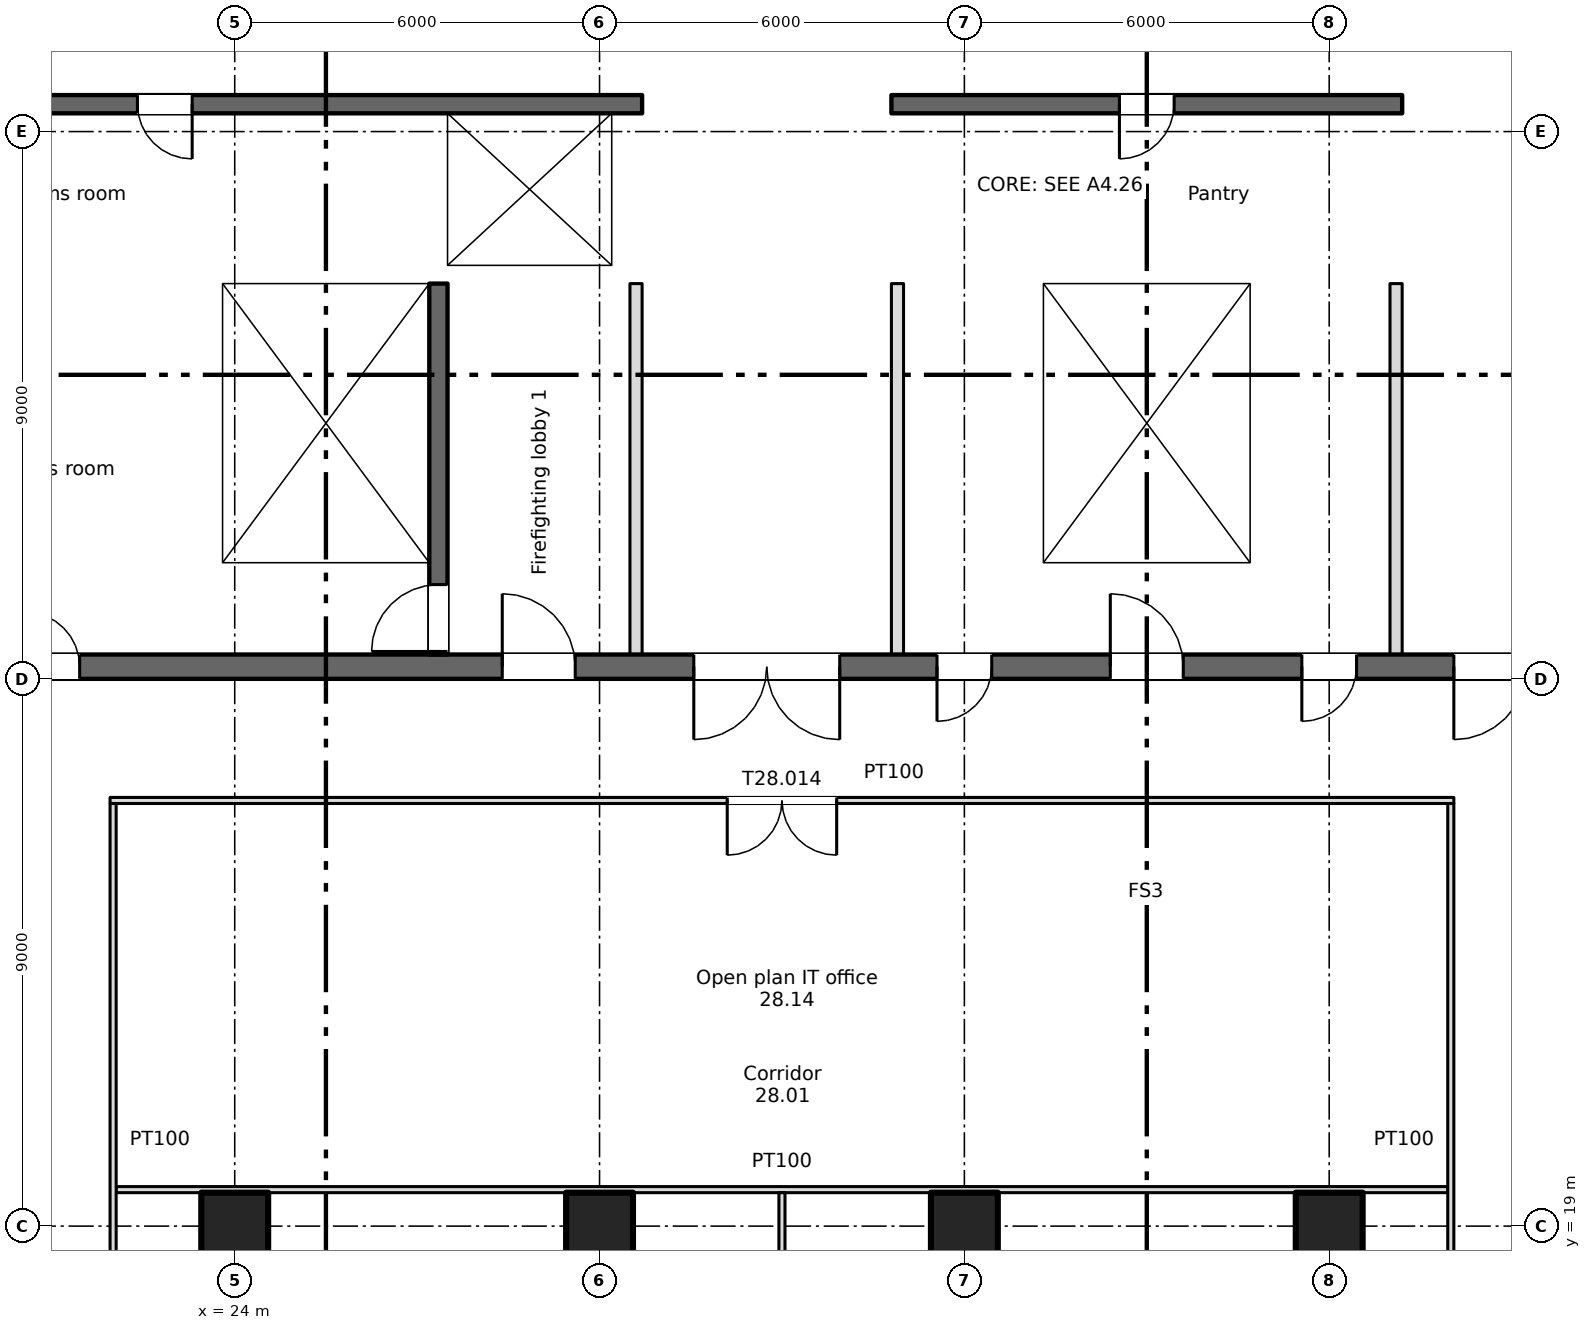
"""IFC4 building model, lengths in metres.
Left out: names, types, materials, properties, quantities, classifications, styles, units other than length and angle.
Written with IfcOpenShell. Run it as: python <this file> out.ifc"""

import sys

from ifc_helpers import new_model, si_unit, direction, frame, frame_2d, origin, origin_2d, place, context, subcontext, project, spatial, rectangle, extrude, element, fill, save


model = new_model("IFC4")
c1 = context("Model", 3, precision=1e-05, world=origin(), true_north=direction((0.0, 1.0)))
c2 = subcontext(c1, "Body", "Model", "MODEL_VIEW")
j1 = project(units=[si_unit("LENGTHUNIT", "METRE"), si_unit("PLANEANGLEUNIT", "RADIAN")], contexts=[c1])
p1 = place(None, origin())
s1 = spatial("IfcSite", under=j1, at=p1, CompositionType="ELEMENT")
p2 = place(p1, origin())
s2 = spatial("IfcBuilding", under=s1, at=p2, CompositionType="ELEMENT")
p3 = place(p2, frame((0.0, 0.0, 193.0)))
s3 = spatial("IfcBuildingStorey", under=s2, at=p3, CompositionType="ELEMENT", Elevation=193.0)
for number, where, z_axis, x_axis in (
    (1, (24.0, 19.0, 0.0), (0.0, 0.0, 1.0), (1.0, 0.0, 0.0)),
    (2, (30.0, 19.0, 0.0), (0.0, 0.0, 1.0), (1.0, 0.0, 0.0)),
    (3, (36.0, 19.0, 0.0), (0.0, 0.0, 1.0), (1.0, 0.0, 0.0)),
    (4, (42.0, 19.0, 0.0), (0.0, 0.0, 1.0), (1.0, 0.0, 0.0)),
):
    element("IfcColumn", number, at=place(p3, frame(where, z_axis=z_axis, x_axis=x_axis)), inside=s3, PredefinedType="COLUMN", context=c2, shape_type="SweptSolid", body=[
        extrude(rectangle(XDim=1.1, YDim=1.1, at=origin_2d()), origin(), (0.0, 0.0, 1.0), 3.35),
    ])
p4 = place(p3, frame((6.6, 28.2, 0.0), z_axis=(0.0, 0.0, 1.0), x_axis=(1.0, 0.0, 0.0)))
e5 = element("IfcWall", 5, at=p4, inside=s3, PredefinedType="SHEAR", context=c2, shape_type="SweptSolid", body=[
    extrude(rectangle(XDim=57.9, YDim=0.4, at=frame_2d((28.95, 0.0))), origin(), (0.0, 0.0, 1.0), 3.35),
])
p5 = place(p4, frame((13.95, 0.0, 0.0)))
e6 = element("IfcOpeningElement", 6, at=p5, cuts=e5, PredefinedType="OPENING", context=c2, shape_type="SweptSolid", body=[
    extrude(rectangle(XDim=0.9, YDim=2.1, at=frame_2d((0.45, 1.05))), frame((0.0, 0.21, 0.0), z_axis=(0.0, -1.0, 0.0), x_axis=(1.0, 0.0, 0.0)), (0.0, 0.0, 1.0), 0.42),
])
p6 = place(p4, frame((48.663, 0.0, 0.0)))
e7 = element("IfcOpeningElement", 7, at=p6, cuts=e5, PredefinedType="OPENING", context=c2, shape_type="SweptSolid", body=[
    extrude(rectangle(XDim=0.9, YDim=2.1, at=frame_2d((0.45, 1.05))), frame((0.0, 0.21, 0.0), z_axis=(0.0, -1.0, 0.0), x_axis=(1.0, 0.0, 0.0)), (0.0, 0.0, 1.0), 0.42),
])
p7 = place(p4, frame((51.238, 0.0, 0.0)))
e8 = element("IfcOpeningElement", 8, at=p7, cuts=e5, PredefinedType="OPENING", context=c2, shape_type="SweptSolid", body=[
    extrude(rectangle(XDim=0.9, YDim=2.1, at=frame_2d((0.45, 1.05))), frame((0.0, 0.21, 0.0), z_axis=(0.0, -1.0, 0.0), x_axis=(1.0, 0.0, 0.0)), (0.0, 0.0, 1.0), 0.42),
])
p8 = place(p4, frame((1.45, 0.0, 0.0)))
e9 = element("IfcOpeningElement", 9, at=p8, cuts=e5, PredefinedType="OPENING", context=c2, shape_type="SweptSolid", body=[
    extrude(rectangle(XDim=0.9, YDim=2.1, at=frame_2d((0.45, 1.05))), frame((0.0, 0.21, 0.0), z_axis=(0.0, -1.0, 0.0), x_axis=(1.0, 0.0, 0.0)), (0.0, 0.0, 1.0), 0.42),
])
p9 = place(p4, frame((4.8, 0.0, 0.0)))
e10 = element("IfcOpeningElement", 10, at=p9, cuts=e5, PredefinedType="OPENING", context=c2, shape_type="SweptSolid", body=[
    extrude(rectangle(XDim=1.2, YDim=2.1, at=frame_2d((0.6, 1.05))), frame((0.0, 0.21, 0.0), z_axis=(0.0, -1.0, 0.0), x_axis=(1.0, 0.0, 0.0)), (0.0, 0.0, 1.0), 0.42),
])
p10 = place(p4, frame((31.8, 0.0, 0.0)))
e11 = element("IfcOpeningElement", 11, at=p10, cuts=e5, PredefinedType="OPENING", context=c2, shape_type="SweptSolid", body=[
    extrude(rectangle(XDim=1.2, YDim=2.1, at=frame_2d((0.6, 1.05))), frame((0.0, 0.21, 0.0), z_axis=(0.0, -1.0, 0.0), x_axis=(1.0, 0.0, 0.0)), (0.0, 0.0, 1.0), 0.42),
])
p11 = place(p4, frame((55.3, 0.0, 0.0)))
e12 = element("IfcOpeningElement", 12, at=p11, cuts=e5, PredefinedType="OPENING", context=c2, shape_type="SweptSolid", body=[
    extrude(rectangle(XDim=1.2, YDim=2.1, at=frame_2d((0.6, 1.05))), frame((0.0, 0.21, 0.0), z_axis=(0.0, -1.0, 0.0), x_axis=(1.0, 0.0, 0.0)), (0.0, 0.0, 1.0), 0.42),
])
p12 = place(p4, frame((21.8, 0.0, 0.0)))
e13 = element("IfcOpeningElement", 13, at=p12, cuts=e5, PredefinedType="OPENING", context=c2, shape_type="SweptSolid", body=[
    extrude(rectangle(XDim=1.2, YDim=2.1, at=frame_2d((0.6, 1.05))), frame((0.0, 0.21, 0.0), z_axis=(0.0, -1.0, 0.0), x_axis=(1.0, 0.0, 0.0)), (0.0, 0.0, 1.0), 0.42),
])
p13 = place(p4, frame((41.8, 0.0, 0.0)))
e14 = element("IfcOpeningElement", 14, at=p13, cuts=e5, PredefinedType="OPENING", context=c2, shape_type="SweptSolid", body=[
    extrude(rectangle(XDim=1.2, YDim=2.1, at=frame_2d((0.6, 1.05))), frame((0.0, 0.21, 0.0), z_axis=(0.0, -1.0, 0.0), x_axis=(1.0, 0.0, 0.0)), (0.0, 0.0, 1.0), 0.42),
])
p14 = place(p4, frame((24.95, 0.0, 0.0)))
e15 = element("IfcOpeningElement", 15, at=p14, cuts=e5, PredefinedType="OPENING", context=c2, shape_type="SweptSolid", body=[
    extrude(rectangle(XDim=2.4, YDim=2.1, at=frame_2d((1.2, 1.05))), frame((0.0, 0.21, 0.0), z_axis=(0.0, -1.0, 0.0), x_axis=(1.0, 0.0, 0.0)), (0.0, 0.0, 1.0), 0.42),
])
p15 = place(p4, frame((37.45, 0.0, 0.0)))
e16 = element("IfcOpeningElement", 16, at=p15, cuts=e5, PredefinedType="OPENING", context=c2, shape_type="SweptSolid", body=[
    extrude(rectangle(XDim=2.4, YDim=2.1, at=frame_2d((1.2, 1.05))), frame((0.0, 0.21, 0.0), z_axis=(0.0, -1.0, 0.0), x_axis=(1.0, 0.0, 0.0)), (0.0, 0.0, 1.0), 0.42),
])
p16 = place(p4, frame((8.1, 0.0, 0.0)))
e17 = element("IfcOpeningElement", 17, at=p16, cuts=e5, PredefinedType="OPENING", context=c2, shape_type="SweptSolid", body=[
    extrude(rectangle(XDim=2.4, YDim=2.1, at=frame_2d((1.2, 1.05))), frame((0.0, 0.21, 0.0), z_axis=(0.0, -1.0, 0.0), x_axis=(1.0, 0.0, 0.0)), (0.0, 0.0, 1.0), 0.42),
])
p17 = place(p4, frame((28.95, 0.0, 0.0)))
e18 = element("IfcOpeningElement", 18, at=p17, cuts=e5, PredefinedType="OPENING", context=c2, shape_type="SweptSolid", body=[
    extrude(rectangle(XDim=0.9, YDim=2.1, at=frame_2d((0.45, 1.05))), frame((0.0, 0.21, 0.0), z_axis=(0.0, -1.0, 0.0), x_axis=(1.0, 0.0, 0.0)), (0.0, 0.0, 1.0), 0.42),
])
p18 = place(p4, frame((34.95, 0.0, 0.0)))
e19 = element("IfcOpeningElement", 19, at=p18, cuts=e5, PredefinedType="OPENING", context=c2, shape_type="SweptSolid", body=[
    extrude(rectangle(XDim=0.9, YDim=2.1, at=frame_2d((0.45, 1.05))), frame((0.0, 0.21, 0.0), z_axis=(0.0, -1.0, 0.0), x_axis=(1.0, 0.0, 0.0)), (0.0, 0.0, 1.0), 0.42),
])
p19 = place(p3, frame((23.65, 28.4, 0.0), z_axis=(0.0, 0.0, 1.0), x_axis=(0.0, 1.0, 0.0)))
e20 = element("IfcWall", 20, at=p19, inside=s3, PredefinedType="SHEAR", context=c2, shape_type="SweptSolid", body=[
    extrude(rectangle(XDim=6.1, YDim=0.3, at=frame_2d((3.05, 0.0))), origin(), (0.0, 0.0, 1.0), 3.35),
])
p20 = place(p3, frame((27.35, 28.4, 0.0), z_axis=(0.0, 0.0, 1.0), x_axis=(0.0, 1.0, 0.0)))
e21 = element("IfcWall", 21, at=p20, inside=s3, PredefinedType="SHEAR", context=c2, shape_type="SweptSolid", body=[
    extrude(rectangle(XDim=6.1, YDim=0.3, at=frame_2d((3.05, 0.0))), origin(), (0.0, 0.0, 1.0), 3.35),
])
p21 = place(p20, frame((0.05, 0.0, 0.0)))
e22 = element("IfcOpeningElement", 22, at=p21, cuts=e21, PredefinedType="OPENING", context=c2, shape_type="SweptSolid", body=[
    extrude(rectangle(XDim=1.1, YDim=2.1, at=frame_2d((0.55, 1.05))), frame((0.0, 0.16, 0.0), z_axis=(0.0, -1.0, 0.0), x_axis=(1.0, 0.0, 0.0)), (0.0, 0.0, 1.0), 0.32),
])
for number, where, z_axis, x_axis in (
    (23, (37.15, 28.4, 0.0), (0.0, 0.0, 1.0), (0.0, 1.0, 0.0)),
    (24, (40.85, 28.4, 0.0), (0.0, 0.0, 1.0), (0.0, 1.0, 0.0)),
):
    element("IfcWall", number, at=place(p3, frame(where, z_axis=z_axis, x_axis=x_axis)), inside=s3, PredefinedType="SHEAR", context=c2, shape_type="SweptSolid", body=[
        extrude(rectangle(XDim=6.1, YDim=0.3, at=frame_2d((3.05, 0.0))), origin(), (0.0, 0.0, 1.0), 3.35),
    ])
p22 = place(p3, frame((18.5, 34.65, 0.0), z_axis=(0.0, 0.0, 1.0), x_axis=(1.0, 0.0, 0.0)))
e25 = element("IfcWall", 25, at=p22, inside=s3, PredefinedType="SHEAR", context=c2, shape_type="SweptSolid", body=[
    extrude(rectangle(XDim=12.2, YDim=0.3, at=frame_2d((6.1, 0.0))), origin(), (0.0, 0.0, 1.0), 3.35),
])
p23 = place(p22, frame((9.8, 0.0, 0.0)))
e26 = element("IfcOpeningElement", 26, at=p23, cuts=e25, PredefinedType="OPENING", context=c2, shape_type="SweptSolid", body=[
    extrude(rectangle(XDim=1.1, YDim=2.1, at=frame_2d((0.55, 1.05))), frame((0.0, 0.16, 0.0), z_axis=(0.0, -1.0, 0.0), x_axis=(1.0, 0.0, 0.0)), (0.0, 0.0, 1.0), 0.32),
])
p24 = place(p3, frame((34.8, 34.65, 0.0), z_axis=(0.0, 0.0, 1.0), x_axis=(1.0, 0.0, 0.0)))
e27 = element("IfcWall", 27, at=p24, inside=s3, PredefinedType="SHEAR", context=c2, shape_type="SweptSolid", body=[
    extrude(rectangle(XDim=8.4, YDim=0.3, at=frame_2d((4.2, 0.0))), origin(), (0.0, 0.0, 1.0), 3.35),
])
p25 = place(p3, frame((30.7, 37.45, 0.0), z_axis=(0.0, 0.0, 1.0), x_axis=(-1.0, 0.0, 0.0)))
e28 = element("IfcWall", 28, at=p25, inside=s3, PredefinedType="SHEAR", context=c2, shape_type="SweptSolid", body=[
    extrude(rectangle(XDim=12.2, YDim=0.3, at=frame_2d((6.1, 0.0))), origin(), (0.0, 0.0, 1.0), 3.35),
])
p26 = place(p25, frame((7.4, 0.0, 0.0)))
e29 = element("IfcOpeningElement", 29, at=p26, cuts=e28, PredefinedType="OPENING", context=c2, shape_type="SweptSolid", body=[
    extrude(rectangle(XDim=0.9, YDim=2.1, at=frame_2d((0.45, 1.05))), frame((0.0, 0.16, 0.0), z_axis=(0.0, -1.0, 0.0), x_axis=(1.0, 0.0, 0.0)), (0.0, 0.0, 1.0), 0.32),
])
p27 = place(p3, frame((43.2, 37.45, 0.0), z_axis=(0.0, 0.0, 1.0), x_axis=(-1.0, 0.0, 0.0)))
e30 = element("IfcWall", 30, at=p27, inside=s3, PredefinedType="SHEAR", context=c2, shape_type="SweptSolid", body=[
    extrude(rectangle(XDim=8.4, YDim=0.3, at=frame_2d((4.2, 0.0))), origin(), (0.0, 0.0, 1.0), 3.35),
])
p28 = place(p27, frame((3.75, 0.0, 0.0)))
e31 = element("IfcOpeningElement", 31, at=p28, cuts=e30, PredefinedType="OPENING", context=c2, shape_type="SweptSolid", body=[
    extrude(rectangle(XDim=0.9, YDim=2.1, at=frame_2d((0.45, 1.05))), frame((0.0, 0.16, 0.0), z_axis=(0.0, -1.0, 0.0), x_axis=(1.0, 0.0, 0.0)), (0.0, 0.0, 1.0), 0.32),
])
p29 = place(p3, frame((27.35, 34.8, 0.0), z_axis=(0.0, 0.0, 1.0), x_axis=(0.0, 1.0, 0.0)))
e32 = element("IfcWall", 32, at=p29, inside=s3, PredefinedType="SHEAR", context=c2, shape_type="SweptSolid", body=[
    extrude(rectangle(XDim=2.5, YDim=0.3, at=frame_2d((1.25, 0.0))), origin(), (0.0, 0.0, 1.0), 3.35),
])
p30 = place(p3, frame((30.45, 34.8, 0.0), z_axis=(0.0, 0.0, 1.0), x_axis=(0.0, 1.0, 0.0)))
e33 = element("IfcWall", 33, at=p30, inside=s3, PredefinedType="SHEAR", context=c2, shape_type="SweptSolid", body=[
    extrude(rectangle(XDim=2.5, YDim=0.5, at=frame_2d((1.25, 0.0))), origin(), (0.0, 0.0, 1.0), 3.35),
])
for number, where, z_axis, x_axis in (
    (34, (34.95, 34.8, 0.0), (0.0, 0.0, 1.0), (0.0, 1.0, 0.0)),
    (35, (43.05, 34.8, 0.0), (0.0, 0.0, 1.0), (0.0, 1.0, 0.0)),
):
    element("IfcWall", number, at=place(p3, frame(where, z_axis=z_axis, x_axis=x_axis)), inside=s3, PredefinedType="SHEAR", context=c2, shape_type="SweptSolid", body=[
        extrude(rectangle(XDim=2.5, YDim=0.3, at=frame_2d((1.25, 0.0))), origin(), (0.0, 0.0, 1.0), 3.35),
    ])
for number, where, z_axis, x_axis in (
    (36, (30.6, 28.4, 0.0), (0.0, 0.0, 1.0), (0.0, 1.0, 0.0)),
    (37, (34.9, 28.4, 0.0), (0.0, 0.0, 1.0), (0.0, 1.0, 0.0)),
    (38, (43.1, 28.4, 0.0), (0.0, 0.0, 1.0), (0.0, 1.0, 0.0)),
):
    element("IfcWall", number, at=place(p3, frame(where, z_axis=z_axis, x_axis=x_axis)), inside=s3, PredefinedType="PARTITIONING", context=c2, shape_type="SweptSolid", body=[
        extrude(rectangle(XDim=6.1, YDim=0.2, at=frame_2d((3.05, 0.0))), origin(), (0.0, 0.0, 1.0), 3.35),
    ])
p31 = place(p3, frame((22.05, 19.6, 0.0), z_axis=(0.0, 0.0, 1.0), x_axis=(1.0, 0.0, 0.0)))
e39 = element("IfcWall", 39, at=p31, inside=s3, PredefinedType="PARTITIONING", context=c2, shape_type="SweptSolid", body=[
    extrude(rectangle(XDim=21.9, YDim=0.1, at=frame_2d((10.95, 0.0))), origin(), (0.0, 0.0, 1.0), 3.35),
])
p32 = place(p3, frame((21.95, 26.0, 0.0), z_axis=(0.0, 0.0, 1.0), x_axis=(1.0, 0.0, 0.0)))
e40 = element("IfcWall", 40, at=p32, inside=s3, PredefinedType="PARTITIONING", context=c2, shape_type="SweptSolid", body=[
    extrude(rectangle(XDim=22.1, YDim=0.1, at=frame_2d((11.05, 0.0))), origin(), (0.0, 0.0, 1.0), 3.35),
])
p33 = place(p32, frame((10.15, 0.0, 0.0)))
e41 = element("IfcOpeningElement", 41, at=p33, cuts=e40, PredefinedType="OPENING", context=c2, shape_type="SweptSolid", body=[
    extrude(rectangle(XDim=1.8, YDim=2.1, at=frame_2d((0.9, 1.05))), frame((0.0, 0.06, 0.0), z_axis=(0.0, -1.0, 0.0), x_axis=(1.0, 0.0, 0.0)), (0.0, 0.0, 1.0), 0.12),
])
p34 = place(p3, frame((22.0, 12.65, 0.0), z_axis=(0.0, 0.0, 1.0), x_axis=(0.0, 1.0, 0.0)))
e42 = element("IfcWall", 42, at=p34, inside=s3, PredefinedType="PARTITIONING", context=c2, shape_type="SweptSolid", body=[
    extrude(rectangle(XDim=13.3, YDim=0.1, at=frame_2d((6.65, 0.0))), origin(), (0.0, 0.0, 1.0), 3.35),
])
p35 = place(p3, frame((33.0, 12.65, 0.0), z_axis=(0.0, 0.0, 1.0), x_axis=(0.0, 1.0, 0.0)))
e43 = element("IfcWall", 43, at=p35, inside=s3, PredefinedType="PARTITIONING", context=c2, shape_type="SweptSolid", body=[
    extrude(rectangle(XDim=6.9, YDim=0.1, at=frame_2d((3.45, 0.0))), origin(), (0.0, 0.0, 1.0), 3.35),
])
p36 = place(p3, frame((44.0, 12.65, 0.0), z_axis=(0.0, 0.0, 1.0), x_axis=(0.0, 1.0, 0.0)))
e44 = element("IfcWall", 44, at=p36, inside=s3, PredefinedType="PARTITIONING", context=c2, shape_type="SweptSolid", body=[
    extrude(rectangle(XDim=13.3, YDim=0.1, at=frame_2d((6.65, 0.0))), origin(), (0.0, 0.0, 1.0), 3.35),
])
p37 = place(p5, origin())
e45 = element("IfcDoor", 45, at=p37, inside=s3, OperationType="SINGLE_SWING_LEFT", PredefinedType="DOOR", context=c2, shape_type="SweptSolid", body=[
    extrude(rectangle(XDim=0.9, YDim=2.1, at=frame_2d((0.45, 1.05))), frame((0.0, 0.025, 0.0), z_axis=(0.0, -1.0, 0.0), x_axis=(1.0, 0.0, 0.0)), (0.0, 0.0, 1.0), 0.05),
])
fill(e6, e45)
p38 = place(p26, origin())
e46 = element("IfcDoor", 46, at=p38, inside=s3, OperationType="SINGLE_SWING_LEFT", PredefinedType="DOOR", context=c2, shape_type="SweptSolid", body=[
    extrude(rectangle(XDim=0.9, YDim=2.1, at=frame_2d((0.45, 1.05))), frame((0.0, 0.025, 0.0), z_axis=(0.0, -1.0, 0.0), x_axis=(1.0, 0.0, 0.0)), (0.0, 0.0, 1.0), 0.05),
])
fill(e29, e46)
p39 = place(p28, origin())
e47 = element("IfcDoor", 47, at=p39, inside=s3, OperationType="SINGLE_SWING_RIGHT", PredefinedType="DOOR", context=c2, shape_type="SweptSolid", body=[
    extrude(rectangle(XDim=0.9, YDim=2.1, at=frame_2d((0.45, 1.05))), frame((0.0, 0.025, 0.0), z_axis=(0.0, -1.0, 0.0), x_axis=(1.0, 0.0, 0.0)), (0.0, 0.0, 1.0), 0.05),
])
fill(e31, e47)
p40 = place(p23, origin())
e48 = element("IfcDoor", 48, at=p40, inside=s3, OperationType="SLIDING_TO_LEFT", PredefinedType="DOOR", context=c2, shape_type="SweptSolid", body=[
    extrude(rectangle(XDim=1.1, YDim=2.1, at=frame_2d((0.55, 1.05))), frame((0.0, 0.025, 0.0), z_axis=(0.0, -1.0, 0.0), x_axis=(1.0, 0.0, 0.0)), (0.0, 0.0, 1.0), 0.05),
])
fill(e26, e48)
p41 = place(p21, origin())
e49 = element("IfcDoor", 49, at=p41, inside=s3, OperationType="SINGLE_SWING_LEFT", PredefinedType="DOOR", context=c2, shape_type="SweptSolid", body=[
    extrude(rectangle(XDim=1.1, YDim=2.1, at=frame_2d((0.55, 1.05))), frame((0.0, 0.025, 0.0), z_axis=(0.0, -1.0, 0.0), x_axis=(1.0, 0.0, 0.0)), (0.0, 0.0, 1.0), 0.05),
])
fill(e22, e49)
p42 = place(p10, origin())
e50 = element("IfcDoor", 50, at=p42, inside=s3, OperationType="SINGLE_SWING_LEFT", PredefinedType="DOOR", context=c2, shape_type="SweptSolid", body=[
    extrude(rectangle(XDim=1.2, YDim=2.1, at=frame_2d((0.6, 1.05))), frame((0.0, 0.025, 0.0), z_axis=(0.0, -1.0, 0.0), x_axis=(1.0, 0.0, 0.0)), (0.0, 0.0, 1.0), 0.05),
])
fill(e11, e50)
p43 = place(p12, origin())
e51 = element("IfcDoor", 51, at=p43, inside=s3, OperationType="SINGLE_SWING_LEFT", PredefinedType="DOOR", context=c2, shape_type="SweptSolid", body=[
    extrude(rectangle(XDim=1.2, YDim=2.1, at=frame_2d((0.6, 1.05))), frame((0.0, 0.025, 0.0), z_axis=(0.0, -1.0, 0.0), x_axis=(1.0, 0.0, 0.0)), (0.0, 0.0, 1.0), 0.05),
])
fill(e13, e51)
p44 = place(p14, origin())
e52 = element("IfcDoor", 52, at=p44, inside=s3, OperationType="DOUBLE_DOOR_SINGLE_SWING", PredefinedType="DOOR", context=c2, shape_type="SweptSolid", body=[
    extrude(rectangle(XDim=2.4, YDim=2.1, at=frame_2d((1.2, 1.05))), frame((0.0, 0.025, 0.0), z_axis=(0.0, -1.0, 0.0), x_axis=(1.0, 0.0, 0.0)), (0.0, 0.0, 1.0), 0.05),
])
fill(e15, e52)
p45 = place(p15, origin())
e53 = element("IfcDoor", 53, at=p45, inside=s3, OperationType="DOUBLE_DOOR_SINGLE_SWING", PredefinedType="DOOR", context=c2, shape_type="SweptSolid", body=[
    extrude(rectangle(XDim=2.4, YDim=2.1, at=frame_2d((1.2, 1.05))), frame((0.0, 0.025, 0.0), z_axis=(0.0, -1.0, 0.0), x_axis=(1.0, 0.0, 0.0)), (0.0, 0.0, 1.0), 0.05),
])
fill(e16, e53)
p46 = place(p17, origin())
e54 = element("IfcDoor", 54, at=p46, inside=s3, OperationType="SINGLE_SWING_LEFT", PredefinedType="DOOR", context=c2, shape_type="SweptSolid", body=[
    extrude(rectangle(XDim=0.9, YDim=2.1, at=frame_2d((0.45, 1.05))), frame((0.0, 0.025, 0.0), z_axis=(0.0, -1.0, 0.0), x_axis=(1.0, 0.0, 0.0)), (0.0, 0.0, 1.0), 0.05),
])
fill(e18, e54)
p47 = place(p18, origin())
e55 = element("IfcDoor", 55, at=p47, inside=s3, OperationType="SINGLE_SWING_LEFT", PredefinedType="DOOR", context=c2, shape_type="SweptSolid", body=[
    extrude(rectangle(XDim=0.9, YDim=2.1, at=frame_2d((0.45, 1.05))), frame((0.0, 0.025, 0.0), z_axis=(0.0, -1.0, 0.0), x_axis=(1.0, 0.0, 0.0)), (0.0, 0.0, 1.0), 0.05),
])
fill(e19, e55)
p48 = place(p33, origin())
e56 = element("IfcDoor", 56, at=p48, inside=s3, OperationType="DOUBLE_DOOR_SINGLE_SWING", PredefinedType="DOOR", context=c2, shape_type="SweptSolid", body=[
    extrude(rectangle(XDim=1.8, YDim=2.1, at=frame_2d((0.9, 1.05))), frame((0.0, 0.025, 0.0), z_axis=(0.0, -1.0, 0.0), x_axis=(1.0, 0.0, 0.0)), (0.0, 0.0, 1.0), 0.05),
])
fill(e41, e56)
save(model, sys.argv[1])
